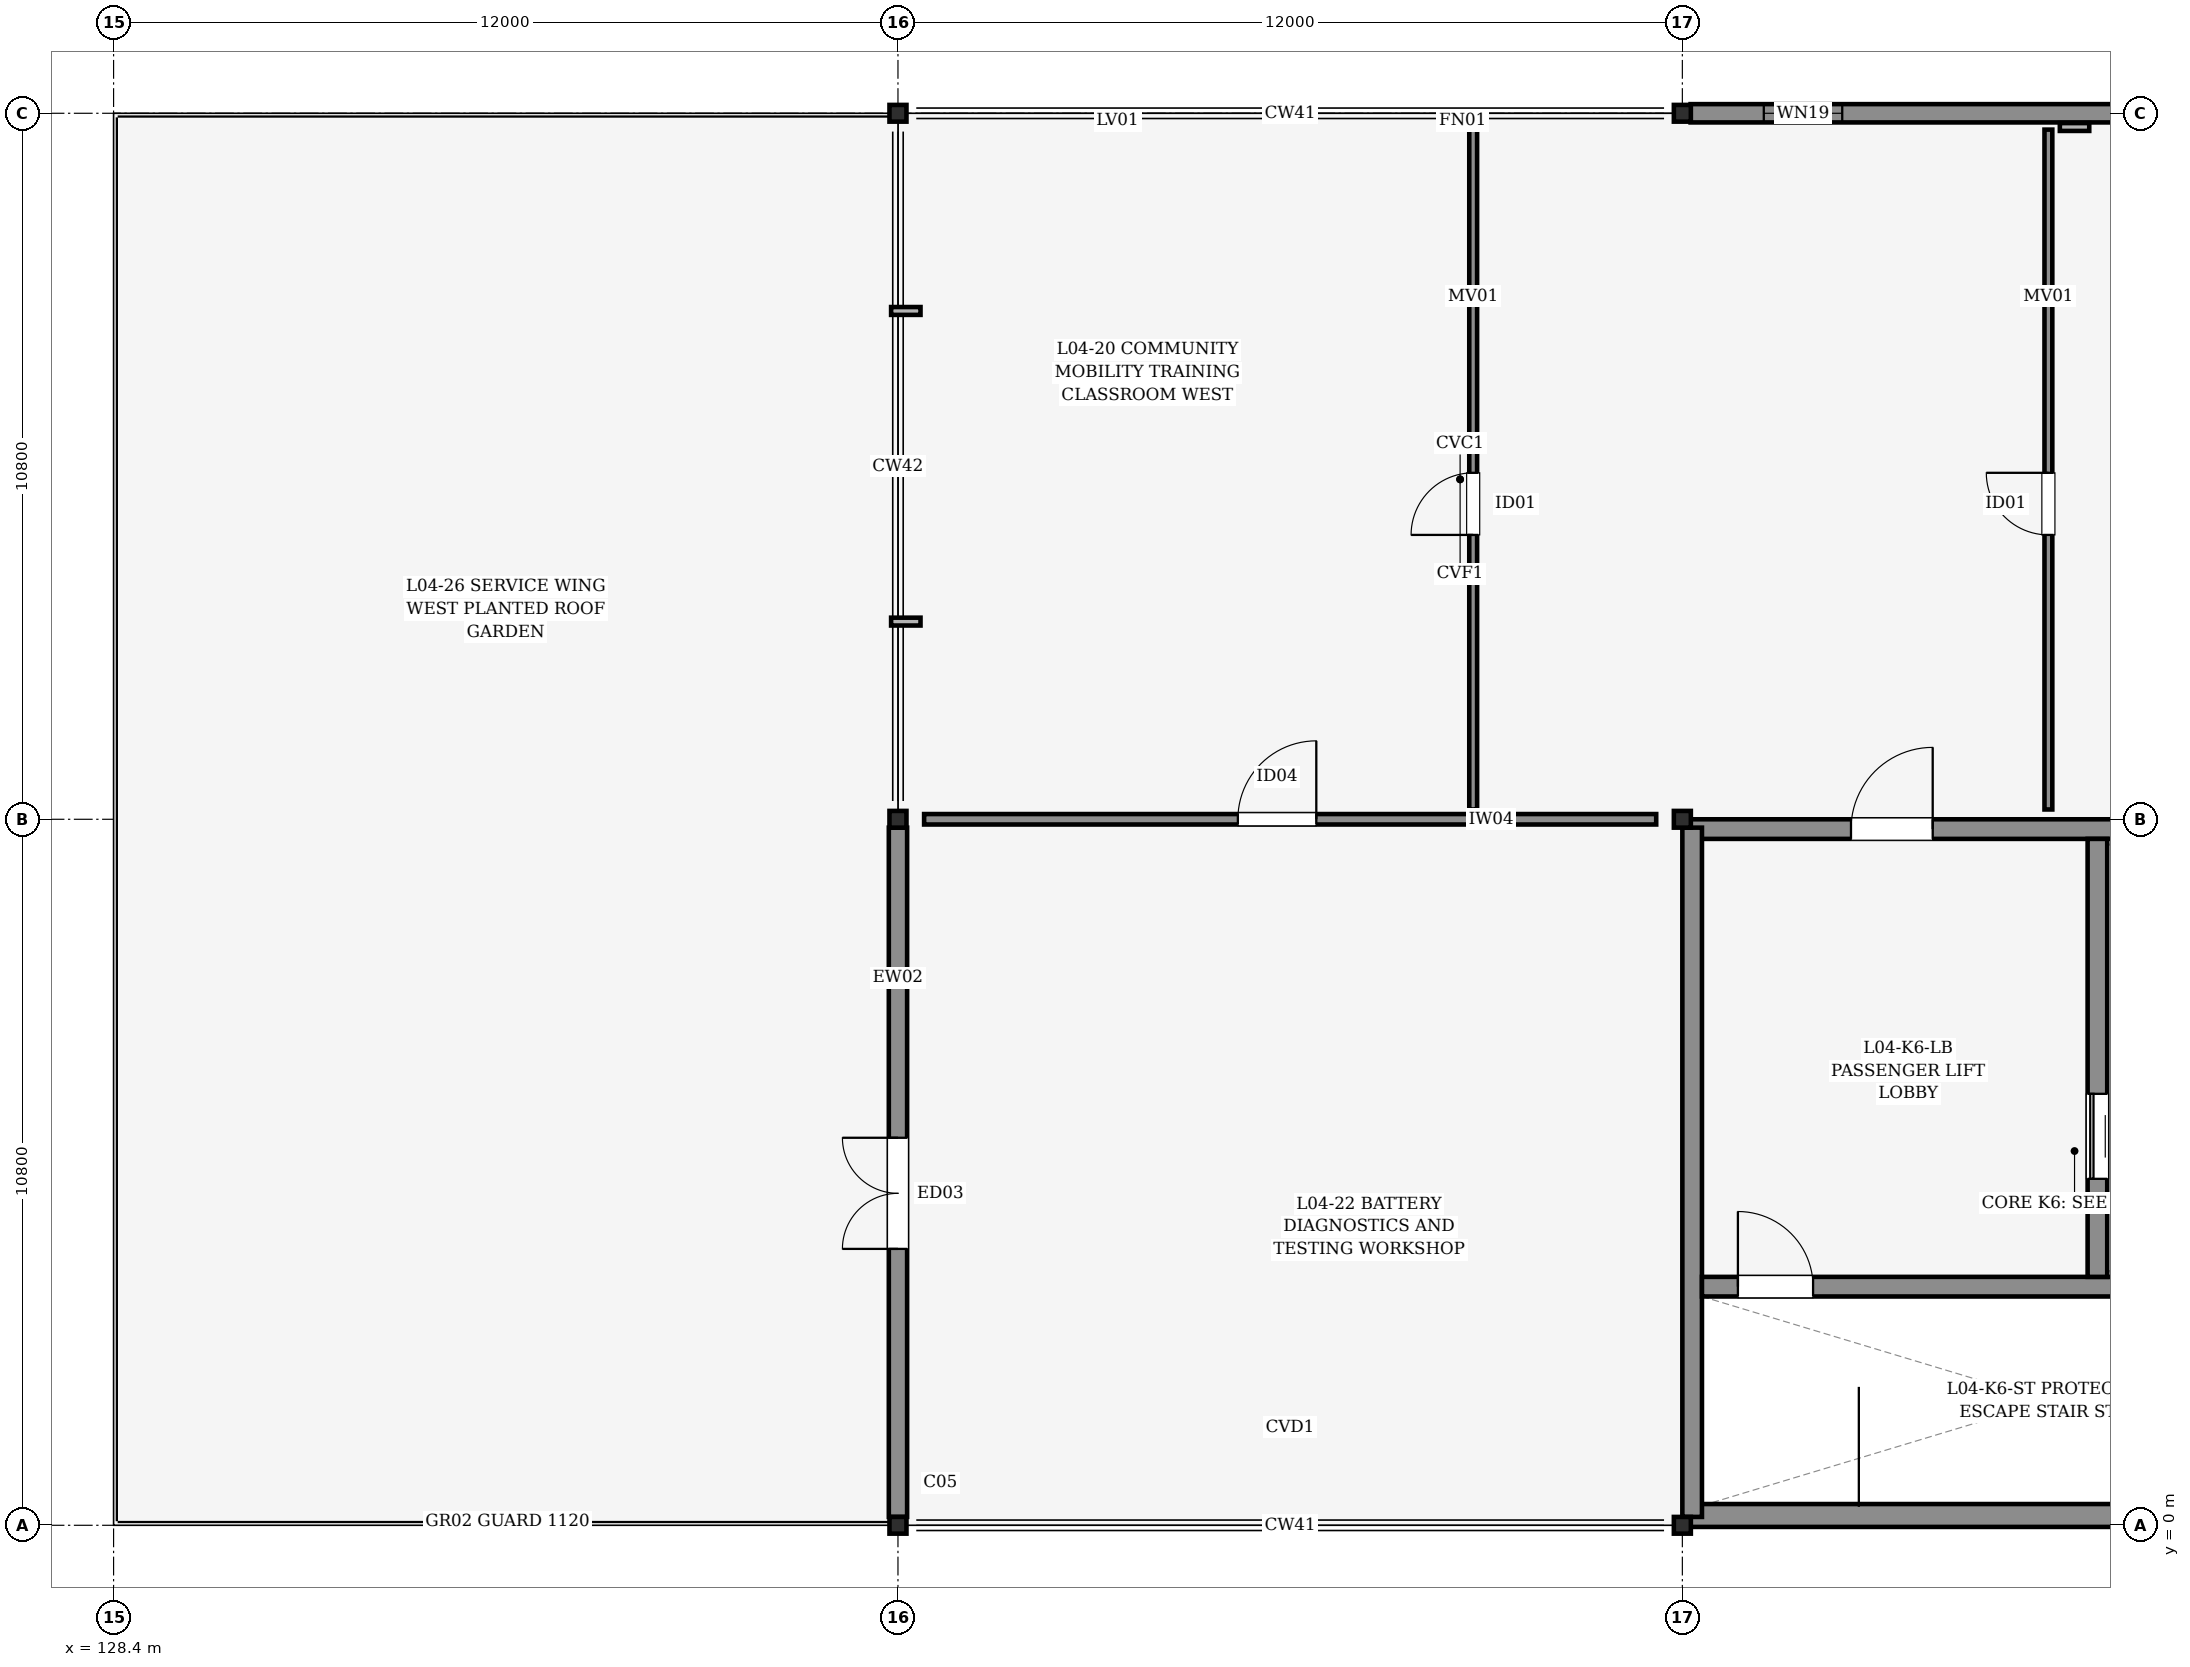
"""IFC4 building model, lengths in metres.
Left out: names, types, materials, properties, quantities, classifications, styles, units other than length and angle.
Written with IfcOpenShell. Run it as: python <this file> out.ifc"""

import sys

from ifc_helpers import new_model, si_unit, direction, frame, frame_2d, origin, origin_2d, place, context, subcontext, project, spatial, rectangle, i_section, extrude, element, fill, save


model = new_model("IFC4")
c1 = context("Model", 3, precision=1e-05, world=origin(), true_north=direction((0.0, 1.0)))
c2 = subcontext(c1, "Body", "Model", "MODEL_VIEW")
j1 = project(units=[si_unit("LENGTHUNIT", "METRE"), si_unit("PLANEANGLEUNIT", "RADIAN")], contexts=[c1])
p1 = place(None, origin())
s1 = spatial("IfcSite", under=j1, at=p1, CompositionType="ELEMENT")
p2 = place(p1, origin())
s2 = spatial("IfcBuilding", under=s1, at=p2, CompositionType="ELEMENT")
p3 = place(p2, frame((0.0, 0.0, 16.2)))
s3 = spatial("IfcBuildingStorey", under=s2, at=p3, CompositionType="ELEMENT", Elevation=16.2)
for number, where, z_axis, x_axis in (
    (1, (140.4, 0.0, 0.0), (0.0, 0.0, 1.0), (1.0, 0.0, 0.0)),
    (2, (140.4, 10.8, 0.0), (0.0, 0.0, 1.0), (1.0, 0.0, 0.0)),
    (3, (140.4, 21.6, 0.0), (0.0, 0.0, 1.0), (1.0, 0.0, 0.0)),
    (4, (152.4, 0.0, 0.0), (0.0, 0.0, 1.0), (1.0, 0.0, 0.0)),
    (5, (152.4, 10.8, 0.0), (0.0, 0.0, 1.0), (1.0, 0.0, 0.0)),
    (6, (152.4, 21.6, 0.0), (0.0, 0.0, 1.0), (1.0, 0.0, 0.0)),
):
    element("IfcColumn", number, at=place(p3, frame(where, z_axis=z_axis, x_axis=x_axis)), inside=s3, PredefinedType="COLUMN", context=c2, shape_type="SweptSolid", body=[
        extrude(i_section(OverallWidth=0.256, OverallDepth=0.26, WebThickness=0.01, FlangeThickness=0.017, FilletRadius=0.013, at=origin_2d()), origin(), (0.0, 0.0, 1.0), 3.6),
    ])
p4 = place(p3, frame((140.4, 0.128, 0.0), z_axis=(0.0, 0.0, 1.0), x_axis=(0.0, 1.0, 0.0)))
e7 = element("IfcWall", 7, at=p4, inside=s3, PredefinedType="STANDARD", context=c2, shape_type="SweptSolid", body=[
    extrude(rectangle(XDim=10.544, YDim=0.28, at=frame_2d((5.272, 0.0))), origin(), (0.0, 0.0, 1.0), 2.535),
])
p5 = place(p4, frame((4.1, 0.0, 0.0)))
e8 = element("IfcOpeningElement", 8, at=p5, cuts=e7, PredefinedType="OPENING", context=c2, shape_type="SweptSolid", body=[
    extrude(rectangle(XDim=1.7, YDim=2.2, at=frame_2d((0.85, 1.1))), frame((0.0, 0.15, 0.0), z_axis=(0.0, -1.0, 0.0), x_axis=(1.0, 0.0, 0.0)), (0.0, 0.0, 1.0), 0.3),
])
p6 = place(p3, frame((152.526, 21.6, 0.0), z_axis=(0.0, 0.0, 1.0), x_axis=(1.0, 0.0, 0.0)))
e9 = element("IfcWall", 9, at=p6, inside=s3, PredefinedType="STANDARD", context=c2, shape_type="SweptSolid", body=[
    extrude(rectangle(XDim=11.748, YDim=0.28, at=frame_2d((5.874, 0.0))), origin(), (0.0, 0.0, 1.0), 2.535),
])
p7 = place(p6, frame((1.12, 0.0, 0.595)))
e10 = element("IfcOpeningElement", 10, at=p7, cuts=e9, PredefinedType="OPENING", context=c2, shape_type="SweptSolid", body=[
    extrude(rectangle(XDim=1.2, YDim=1.8, at=frame_2d((0.6, 0.9))), frame((0.0, 0.15, 0.0), z_axis=(0.0, -1.0, 0.0), x_axis=(1.0, 0.0, 0.0)), (0.0, 0.0, 1.0), 0.3),
])
p8 = place(p6, frame((9.09, 0.0, 0.65)))
e11 = element("IfcOpeningElement", 11, at=p8, cuts=e9, PredefinedType="OPENING", context=c2, shape_type="SweptSolid", body=[
    extrude(rectangle(XDim=1.2, YDim=1.2, at=frame_2d((0.6, 0.6))), frame((0.0, 0.15, 0.0), z_axis=(0.0, -1.0, 0.0), x_axis=(1.0, 0.0, 0.0)), (0.0, 0.0, 1.0), 0.3),
])
p9 = place(p3, frame((152.526, 0.15, 0.0), z_axis=(0.0, 0.0, 1.0), x_axis=(1.0, 0.0, 0.0)))
e12 = element("IfcWall", 12, at=p9, inside=s3, PredefinedType="SHEAR", context=c2, shape_type="SweptSolid", body=[
    extrude(rectangle(XDim=11.748, YDim=0.35, at=frame_2d((5.874, 0.0))), origin(), (0.0, 0.0, 1.0), 3.38),
])
p10 = place(p3, frame((152.526, 10.65, 0.0), z_axis=(0.0, 0.0, 1.0), x_axis=(1.0, 0.0, 0.0)))
e13 = element("IfcWall", 13, at=p10, inside=s3, PredefinedType="SHEAR", context=c2, shape_type="SweptSolid", body=[
    extrude(rectangle(XDim=11.748, YDim=0.3, at=frame_2d((5.874, 0.0))), origin(), (0.0, 0.0, 1.0), 3.38),
])
p11 = place(p10, frame((2.454, 0.0, 0.0)))
e14 = element("IfcOpeningElement", 14, at=p11, cuts=e13, PredefinedType="OPENING", context=c2, shape_type="SweptSolid", body=[
    extrude(rectangle(XDim=1.25, YDim=2.15, at=frame_2d((0.625, 1.075))), frame((0.0, 0.16, 0.0), z_axis=(0.0, -1.0, 0.0), x_axis=(1.0, 0.0, 0.0)), (0.0, 0.0, 1.0), 0.32),
])
p12 = place(p3, frame((152.55, 0.128, 0.0), z_axis=(0.0, 0.0, 1.0), x_axis=(0.0, 1.0, 0.0)))
e15 = element("IfcWall", 15, at=p12, inside=s3, PredefinedType="SHEAR", context=c2, shape_type="SweptSolid", body=[
    extrude(rectangle(XDim=10.544, YDim=0.3, at=frame_2d((5.272, 0.0))), origin(), (0.0, 0.0, 1.0), 3.38),
])
p13 = place(p3, frame((152.7, 3.65, 0.0), z_axis=(0.0, 0.0, 1.0), x_axis=(1.0, 0.0, 0.0)))
e16 = element("IfcWall", 16, at=p13, inside=s3, PredefinedType="SHEAR", context=c2, shape_type="SweptSolid", body=[
    extrude(rectangle(XDim=11.4, YDim=0.3, at=frame_2d((5.7, 0.0))), origin(), (0.0, 0.0, 1.0), 3.38),
])
p14 = place(p13, frame((0.55, 0.0, 0.0)))
e17 = element("IfcOpeningElement", 17, at=p14, cuts=e16, PredefinedType="OPENING", context=c2, shape_type="SweptSolid", body=[
    extrude(rectangle(XDim=1.15, YDim=2.15, at=frame_2d((0.575, 1.075))), frame((0.0, 0.16, 0.0), z_axis=(0.0, -1.0, 0.0), x_axis=(1.0, 0.0, 0.0)), (0.0, 0.0, 1.0), 0.32),
])
p15 = place(p3, frame((158.75, 3.8, 0.0), z_axis=(0.0, 0.0, 1.0), x_axis=(0.0, 1.0, 0.0)))
e18 = element("IfcWall", 18, at=p15, inside=s3, PredefinedType="SHEAR", context=c2, shape_type="SweptSolid", body=[
    extrude(rectangle(XDim=6.7, YDim=0.3, at=frame_2d((3.35, 0.0))), origin(), (0.0, 0.0, 1.0), 3.38),
])
p16 = place(p15, frame((1.5, 0.0, 0.0)))
e19 = element("IfcOpeningElement", 19, at=p16, cuts=e18, PredefinedType="OPENING", context=c2, shape_type="SweptSolid", body=[
    extrude(rectangle(XDim=1.3, YDim=2.3, at=frame_2d((0.65, 1.15))), frame((0.0, 0.16, 0.0), z_axis=(0.0, -1.0, 0.0), x_axis=(1.0, 0.0, 0.0)), (0.0, 0.0, 1.0), 0.32),
])
p17 = place(p3, frame((140.8, 10.8, 0.0), z_axis=(0.0, 0.0, 1.0), x_axis=(1.0, 0.0, 0.0)))
e20 = element("IfcWall", 20, at=p17, inside=s3, PredefinedType="PARTITIONING", context=c2, shape_type="SweptSolid", body=[
    extrude(rectangle(XDim=11.2, YDim=0.16, at=frame_2d((5.6, 0.0))), origin(), (0.0, 0.0, 1.0), 2.525),
])
p18 = place(p17, frame((4.8, 0.0, 0.0)))
e21 = element("IfcOpeningElement", 21, at=p18, cuts=e20, PredefinedType="OPENING", context=c2, shape_type="SweptSolid", body=[
    extrude(rectangle(XDim=1.2, YDim=2.15, at=frame_2d((0.6, 1.075))), frame((0.0, 0.09, 0.0), z_axis=(0.0, -1.0, 0.0), x_axis=(1.0, 0.0, 0.0)), (0.0, 0.0, 1.0), 0.18),
])
p19 = place(p3, frame((149.2, 10.95, 0.0), z_axis=(0.0, 0.0, 1.0), x_axis=(0.0, 1.0, 0.0)))
e22 = element("IfcWall", 22, at=p19, inside=s3, PredefinedType="MOVABLE", context=c2, shape_type="SweptSolid", body=[
    extrude(rectangle(XDim=10.4, YDim=0.12, at=frame_2d((5.2, 0.0))), origin(), (0.0, 0.0, 1.0), 2.525),
])
p20 = place(p19, frame((4.2, 0.0, 0.0)))
e23 = element("IfcOpeningElement", 23, at=p20, cuts=e22, PredefinedType="OPENING", context=c2, shape_type="SweptSolid", body=[
    extrude(rectangle(XDim=0.95, YDim=2.1, at=frame_2d((0.475, 1.05))), frame((0.0, 0.07, 0.0), z_axis=(0.0, -1.0, 0.0), x_axis=(1.0, 0.0, 0.0)), (0.0, 0.0, 1.0), 0.14),
])
p21 = place(p3, frame((158.0, 10.95, 0.0), z_axis=(0.0, 0.0, 1.0), x_axis=(0.0, 1.0, 0.0)))
e24 = element("IfcWall", 24, at=p21, inside=s3, PredefinedType="MOVABLE", context=c2, shape_type="SweptSolid", body=[
    extrude(rectangle(XDim=10.4, YDim=0.12, at=frame_2d((5.2, 0.0))), origin(), (0.0, 0.0, 1.0), 2.525),
])
p22 = place(p21, frame((4.2, 0.0, 0.0)))
e25 = element("IfcOpeningElement", 25, at=p22, cuts=e24, PredefinedType="OPENING", context=c2, shape_type="SweptSolid", body=[
    extrude(rectangle(XDim=0.95, YDim=2.1, at=frame_2d((0.475, 1.05))), frame((0.0, 0.07, 0.0), z_axis=(0.0, -1.0, 0.0), x_axis=(1.0, 0.0, 0.0)), (0.0, 0.0, 1.0), 0.14),
])
p23 = place(p5, origin())
e26 = element("IfcDoor", 26, at=p23, inside=s3, OperationType="DOUBLE_DOOR_SINGLE_SWING", PredefinedType="DOOR", context=c2, shape_type="SweptSolid", body=[
    extrude(rectangle(XDim=1.7, YDim=2.2, at=frame_2d((0.85, 1.1))), frame((0.0, 0.025, 0.0), z_axis=(0.0, -1.0, 0.0), x_axis=(1.0, 0.0, 0.0)), (0.0, 0.0, 1.0), 0.05),
])
fill(e8, e26)
p24 = place(p7, origin())
e27 = element("IfcWindow", 27, at=p24, inside=s3, PartitioningType="SINGLE_PANEL", PredefinedType="WINDOW", context=c2, shape_type="SweptSolid", body=[
    extrude(rectangle(XDim=1.2, YDim=1.8, at=frame_2d((0.6, 0.9))), frame((0.0, 0.03, 0.0), z_axis=(0.0, -1.0, 0.0), x_axis=(1.0, 0.0, 0.0)), (0.0, 0.0, 1.0), 0.06),
])
fill(e10, e27)
p25 = place(p11, origin())
e28 = element("IfcDoor", 28, at=p25, inside=s3, OperationType="SINGLE_SWING_RIGHT", PredefinedType="DOOR", context=c2, shape_type="SweptSolid", body=[
    extrude(rectangle(XDim=1.25, YDim=2.15, at=frame_2d((0.625, 1.075))), frame((0.0, 0.025, 0.0), z_axis=(0.0, -1.0, 0.0), x_axis=(1.0, 0.0, 0.0)), (0.0, 0.0, 1.0), 0.05),
])
fill(e14, e28)
p26 = place(p14, origin())
e29 = element("IfcDoor", 29, at=p26, inside=s3, OperationType="SINGLE_SWING_LEFT", PredefinedType="DOOR", context=c2, shape_type="SweptSolid", body=[
    extrude(rectangle(XDim=1.15, YDim=2.15, at=frame_2d((0.575, 1.075))), frame((0.0, 0.025, 0.0), z_axis=(0.0, -1.0, 0.0), x_axis=(1.0, 0.0, 0.0)), (0.0, 0.0, 1.0), 0.05),
])
fill(e17, e29)
p27 = place(p16, origin())
e30 = element("IfcDoor", 30, at=p27, inside=s3, OperationType="SLIDING_TO_LEFT", PredefinedType="DOOR", context=c2, shape_type="SweptSolid", body=[
    extrude(rectangle(XDim=1.3, YDim=2.3, at=frame_2d((0.65, 1.15))), frame((0.0, 0.025, 0.0), z_axis=(0.0, -1.0, 0.0), x_axis=(1.0, 0.0, 0.0)), (0.0, 0.0, 1.0), 0.05),
])
fill(e19, e30)
p28 = place(p18, origin())
e31 = element("IfcDoor", 31, at=p28, inside=s3, OperationType="SINGLE_SWING_RIGHT", PredefinedType="DOOR", context=c2, shape_type="SweptSolid", body=[
    extrude(rectangle(XDim=1.2, YDim=2.15, at=frame_2d((0.6, 1.075))), frame((0.0, 0.025, 0.0), z_axis=(0.0, -1.0, 0.0), x_axis=(1.0, 0.0, 0.0)), (0.0, 0.0, 1.0), 0.05),
])
fill(e21, e31)
p29 = place(p20, origin())
e32 = element("IfcDoor", 32, at=p29, inside=s3, OperationType="SINGLE_SWING_LEFT", PredefinedType="DOOR", context=c2, shape_type="SweptSolid", body=[
    extrude(rectangle(XDim=0.95, YDim=2.1, at=frame_2d((0.475, 1.05))), frame((0.0, 0.025, 0.0), z_axis=(0.0, -1.0, 0.0), x_axis=(1.0, 0.0, 0.0)), (0.0, 0.0, 1.0), 0.05),
])
fill(e23, e32)
p30 = place(p22, origin())
e33 = element("IfcDoor", 33, at=p30, inside=s3, OperationType="SINGLE_SWING_RIGHT", PredefinedType="DOOR", context=c2, shape_type="SweptSolid", body=[
    extrude(rectangle(XDim=0.95, YDim=2.1, at=frame_2d((0.475, 1.05))), frame((0.0, 0.025, 0.0), z_axis=(0.0, -1.0, 0.0), x_axis=(1.0, 0.0, 0.0)), (0.0, 0.0, 1.0), 0.05),
])
fill(e25, e33)
save(model, sys.argv[1])
